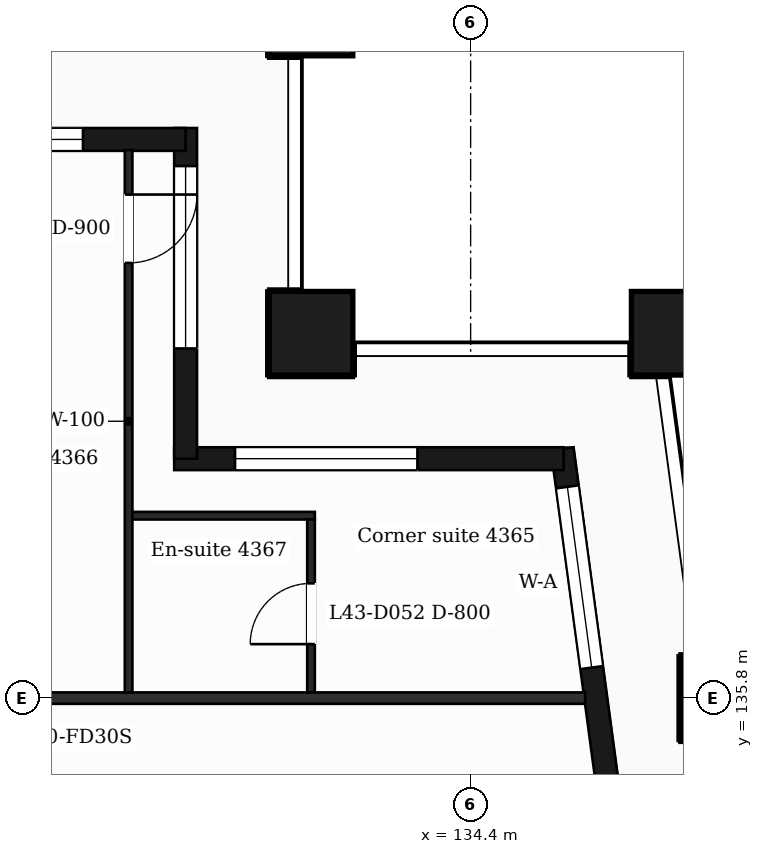
"""IFC4 building model, lengths in metres.
Left out: names, types, materials, properties, quantities, classifications, styles, units other than length and angle.
Written with IfcOpenShell. Run it as: python <this file> out.ifc"""

import sys

from ifc_helpers import new_model, si_unit, direction, frame, frame_2d, origin, origin_2d, place, context, subcontext, project, spatial, rectangle, extrude, element, fill, save


model = new_model("IFC4")
c1 = context("Model", 3, precision=1e-05, world=origin(), true_north=direction((0.0, 1.0)))
c2 = subcontext(c1, "Body", "Model", "MODEL_VIEW")
j1 = project(units=[si_unit("LENGTHUNIT", "METRE"), si_unit("PLANEANGLEUNIT", "RADIAN")], contexts=[c1])
p1 = place(None, origin())
s1 = spatial("IfcSite", under=j1, at=p1, CompositionType="ELEMENT")
p2 = place(p1, origin())
s2 = spatial("IfcBuilding", under=s1, at=p2, CompositionType="ELEMENT")
p3 = place(p2, frame((0.0, 0.0, 181.1)))
s3 = spatial("IfcBuildingStorey", under=s2, at=p3, CompositionType="ELEMENT", Elevation=181.1)
for number, where, z_axis, x_axis in (
    (1, (132.3, 140.6, 0.0), (0.0, 0.0, 1.0), (1.0, 0.0, 0.0)),
    (2, (137.065, 140.6, 0.0), (0.0, 0.0, 1.0), (1.0, 0.0, 0.0)),
    (3, (137.711, 135.8, 0.0), (0.0, 0.0, 1.0), (1.0, 0.0, 0.0)),
    (4, (132.3, 144.8, 0.0), (0.0, 0.0, 1.0), (1.0, 0.0, 0.0)),
):
    element("IfcColumn", number, at=place(p3, frame(where, z_axis=z_axis, x_axis=x_axis)), inside=s3, PredefinedType="COLUMN", context=c2, shape_type="SweptSolid", body=[
        extrude(rectangle(XDim=1.1, YDim=1.1, at=origin_2d()), origin(), (0.0, 0.0, 1.0), 3.7),
    ])
p4 = place(p3, frame((136.504, 132.4, 0.0), z_axis=(0.0, 0.0, 1.0), x_axis=(-0.133399697462, 0.99106231929, 0.0)))
e5 = element("IfcWall", 5, at=p4, inside=s3, PredefinedType="SOLIDWALL", context=c2, shape_type="SweptSolid", body=[
    extrude(rectangle(XDim=6.74, YDim=0.3, at=frame_2d((3.37, 0.0))), origin(), (0.0, 0.0, 1.0), 3.38),
])
p5 = place(p4, frame((1.115, 0.0, 0.0)))
e6 = element("IfcOpeningElement", 6, at=p5, cuts=e5, PredefinedType="OPENING", context=c2, shape_type="SweptSolid", body=[
    extrude(rectangle(XDim=1.2, YDim=2.4, at=frame_2d((0.6, 1.2))), frame((0.0, 0.16, 0.0), z_axis=(0.0, -1.0, 0.0), x_axis=(1.0, 0.0, 0.0)), (0.0, 0.0, 1.0), 0.32),
])
p6 = place(p4, frame((3.835, 0.0, 0.9)))
e7 = element("IfcOpeningElement", 7, at=p6, cuts=e5, PredefinedType="OPENING", context=c2, shape_type="SweptSolid", body=[
    extrude(rectangle(XDim=2.4, YDim=2.1, at=frame_2d((1.2, 1.05))), frame((0.0, 0.16, 0.0), z_axis=(0.0, -1.0, 0.0), x_axis=(1.0, 0.0, 0.0)), (0.0, 0.0, 1.0), 0.32),
])
p7 = place(p3, frame((135.623, 138.95, 0.0), z_axis=(0.0, 0.0, 1.0), x_axis=(-1.0, 0.0, 0.0)))
e8 = element("IfcWall", 8, at=p7, inside=s3, PredefinedType="SOLIDWALL", context=c2, shape_type="SweptSolid", body=[
    extrude(rectangle(XDim=5.123, YDim=0.3, at=frame_2d((2.561, 0.0))), origin(), (0.0, 0.0, 1.0), 3.38),
])
p8 = place(p7, frame((1.923, 0.0, 0.9)))
e9 = element("IfcOpeningElement", 9, at=p8, cuts=e8, PredefinedType="OPENING", context=c2, shape_type="SweptSolid", body=[
    extrude(rectangle(XDim=2.4, YDim=2.1, at=frame_2d((1.2, 1.05))), frame((0.0, 0.16, 0.0), z_axis=(0.0, -1.0, 0.0), x_axis=(1.0, 0.0, 0.0)), (0.0, 0.0, 1.0), 0.32),
])
p9 = place(p3, frame((130.65, 138.95, 0.0), z_axis=(0.0, 0.0, 1.0), x_axis=(0.0, 1.0, 0.0)))
e10 = element("IfcWall", 10, at=p9, inside=s3, PredefinedType="SOLIDWALL", context=c2, shape_type="SweptSolid", body=[
    extrude(rectangle(XDim=4.35, YDim=0.3, at=frame_2d((2.175, 0.0))), origin(), (0.0, 0.0, 1.0), 3.38),
])
p10 = place(p9, frame((1.45, 0.0, 0.9)))
e11 = element("IfcOpeningElement", 11, at=p10, cuts=e10, PredefinedType="OPENING", context=c2, shape_type="SweptSolid", body=[
    extrude(rectangle(XDim=2.4, YDim=2.1, at=frame_2d((1.2, 1.05))), frame((0.0, 0.16, 0.0), z_axis=(0.0, -1.0, 0.0), x_axis=(1.0, 0.0, 0.0)), (0.0, 0.0, 1.0), 0.32),
])
p11 = place(p3, frame((130.65, 143.15, 0.0), z_axis=(0.0, 0.0, 1.0), x_axis=(-1.0, 0.0, 0.0)))
e12 = element("IfcWall", 12, at=p11, inside=s3, PredefinedType="SOLIDWALL", context=c2, shape_type="SweptSolid", body=[
    extrude(rectangle(XDim=14.25, YDim=0.3, at=frame_2d((7.125, 0.0))), origin(), (0.0, 0.0, 1.0), 3.38),
])
p12 = place(p11, frame((1.35, 0.0, 0.9)))
e13 = element("IfcOpeningElement", 13, at=p12, cuts=e12, PredefinedType="OPENING", context=c2, shape_type="SweptSolid", body=[
    extrude(rectangle(XDim=2.4, YDim=2.1, at=frame_2d((1.2, 1.05))), frame((0.0, 0.16, 0.0), z_axis=(0.0, -1.0, 0.0), x_axis=(1.0, 0.0, 0.0)), (0.0, 0.0, 1.0), 0.32),
])
p13 = place(p11, frame((6.15, 0.0, 0.0)))
e14 = element("IfcOpeningElement", 14, at=p13, cuts=e12, PredefinedType="OPENING", context=c2, shape_type="SweptSolid", body=[
    extrude(rectangle(XDim=1.2, YDim=2.4, at=frame_2d((0.6, 1.2))), frame((0.0, 0.16, 0.0), z_axis=(0.0, -1.0, 0.0), x_axis=(1.0, 0.0, 0.0)), (0.0, 0.0, 1.0), 0.32),
])
p14 = place(p11, frame((9.75, 0.0, 0.9)))
e15 = element("IfcOpeningElement", 15, at=p14, cuts=e12, PredefinedType="OPENING", context=c2, shape_type="SweptSolid", body=[
    extrude(rectangle(XDim=2.4, YDim=2.1, at=frame_2d((1.2, 1.05))), frame((0.0, 0.16, 0.0), z_axis=(0.0, -1.0, 0.0), x_axis=(1.0, 0.0, 0.0)), (0.0, 0.0, 1.0), 0.32),
])
p15 = place(p3, frame((90.895, 135.8, 0.0), z_axis=(0.0, 0.0, 1.0), x_axis=(1.0, 0.0, 0.0)))
e16 = element("IfcWall", 16, at=p15, inside=s3, PredefinedType="PARTITIONING", context=c2, shape_type="SweptSolid", body=[
    extrude(rectangle(XDim=45.011, YDim=0.15, at=frame_2d((22.505, 0.0))), origin(), (0.0, 0.0, 1.0), 3.38),
])
p16 = place(p15, frame((6.906, 0.0, 0.0)))
e17 = element("IfcOpeningElement", 17, at=p16, cuts=e16, PredefinedType="OPENING", context=c2, shape_type="SweptSolid", body=[
    extrude(rectangle(XDim=1.0, YDim=2.1, at=frame_2d((0.5, 1.05))), frame((0.0, 0.085, 0.0), z_axis=(0.0, -1.0, 0.0), x_axis=(1.0, 0.0, 0.0)), (0.0, 0.0, 1.0), 0.17),
])
p17 = place(p15, frame((11.875, 0.0, 0.0)))
e18 = element("IfcOpeningElement", 18, at=p17, cuts=e16, PredefinedType="OPENING", context=c2, shape_type="SweptSolid", body=[
    extrude(rectangle(XDim=0.95, YDim=2.1, at=frame_2d((0.475, 1.05))), frame((0.0, 0.085, 0.0), z_axis=(0.0, -1.0, 0.0), x_axis=(1.0, 0.0, 0.0)), (0.0, 0.0, 1.0), 0.17),
])
p18 = place(p15, frame((19.292, 0.0, 0.0)))
e19 = element("IfcOpeningElement", 19, at=p18, cuts=e16, PredefinedType="OPENING", context=c2, shape_type="SweptSolid", body=[
    extrude(rectangle(XDim=0.95, YDim=2.1, at=frame_2d((0.475, 1.05))), frame((0.0, 0.085, 0.0), z_axis=(0.0, -1.0, 0.0), x_axis=(1.0, 0.0, 0.0)), (0.0, 0.0, 1.0), 0.17),
])
p19 = place(p15, frame((23.418, 0.0, 0.0)))
e20 = element("IfcOpeningElement", 20, at=p19, cuts=e16, PredefinedType="OPENING", context=c2, shape_type="SweptSolid", body=[
    extrude(rectangle(XDim=0.95, YDim=2.1, at=frame_2d((0.475, 1.05))), frame((0.0, 0.085, 0.0), z_axis=(0.0, -1.0, 0.0), x_axis=(1.0, 0.0, 0.0)), (0.0, 0.0, 1.0), 0.17),
])
p20 = place(p15, frame((29.425, 0.0, 0.0)))
e21 = element("IfcOpeningElement", 21, at=p20, cuts=e16, PredefinedType="OPENING", context=c2, shape_type="SweptSolid", body=[
    extrude(rectangle(XDim=0.95, YDim=2.1, at=frame_2d((0.475, 1.05))), frame((0.0, 0.085, 0.0), z_axis=(0.0, -1.0, 0.0), x_axis=(1.0, 0.0, 0.0)), (0.0, 0.0, 1.0), 0.17),
])
p21 = place(p15, frame((31.63, 0.0, 0.0)))
e22 = element("IfcOpeningElement", 22, at=p21, cuts=e16, PredefinedType="OPENING", context=c2, shape_type="SweptSolid", body=[
    extrude(rectangle(XDim=0.95, YDim=2.1, at=frame_2d((0.475, 1.05))), frame((0.0, 0.085, 0.0), z_axis=(0.0, -1.0, 0.0), x_axis=(1.0, 0.0, 0.0)), (0.0, 0.0, 1.0), 0.17),
])
p22 = place(p15, frame((36.775, 0.0, 0.0)))
e23 = element("IfcOpeningElement", 23, at=p22, cuts=e16, PredefinedType="OPENING", context=c2, shape_type="SweptSolid", body=[
    extrude(rectangle(XDim=1.0, YDim=2.1, at=frame_2d((0.5, 1.05))), frame((0.0, 0.085, 0.0), z_axis=(0.0, -1.0, 0.0), x_axis=(1.0, 0.0, 0.0)), (0.0, 0.0, 1.0), 0.17),
])
p23 = place(p3, frame((129.9, 138.2, 0.0), z_axis=(0.0, 0.0, 1.0), x_axis=(1.0, 0.0, 0.0)))
e24 = element("IfcWall", 24, at=p23, inside=s3, PredefinedType="PARTITIONING", context=c2, shape_type="SweptSolid", body=[
    extrude(rectangle(XDim=2.45, YDim=0.1, at=frame_2d((1.225, 0.0))), origin(), (0.0, 0.0, 1.0), 3.38),
])
p24 = place(p3, frame((129.9, 135.875, 0.0), z_axis=(0.0, 0.0, 1.0), x_axis=(0.0, 1.0, 0.0)))
e25 = element("IfcWall", 25, at=p24, inside=s3, PredefinedType="PARTITIONING", context=c2, shape_type="SweptSolid", body=[
    extrude(rectangle(XDim=7.135, YDim=0.1, at=frame_2d((3.567, 0.0))), origin(), (0.0, 0.0, 1.0), 3.38),
])
p25 = place(p24, frame((5.65, 0.0, 0.0)))
e26 = element("IfcOpeningElement", 26, at=p25, cuts=e25, PredefinedType="OPENING", context=c2, shape_type="SweptSolid", body=[
    extrude(rectangle(XDim=0.9, YDim=2.1, at=frame_2d((0.45, 1.05))), frame((0.0, 0.06, 0.0), z_axis=(0.0, -1.0, 0.0), x_axis=(1.0, 0.0, 0.0)), (0.0, 0.0, 1.0), 0.12),
])
p26 = place(p3, frame((132.3, 135.875, 0.0), z_axis=(0.0, 0.0, 1.0), x_axis=(0.0, 1.0, 0.0)))
e27 = element("IfcWall", 27, at=p26, inside=s3, PredefinedType="PARTITIONING", context=c2, shape_type="SweptSolid", body=[
    extrude(rectangle(XDim=2.275, YDim=0.1, at=frame_2d((1.137, 0.0))), origin(), (0.0, 0.0, 1.0), 3.38),
])
p27 = place(p26, frame((0.635, 0.0, 0.0)))
e28 = element("IfcOpeningElement", 28, at=p27, cuts=e27, PredefinedType="OPENING", context=c2, shape_type="SweptSolid", body=[
    extrude(rectangle(XDim=0.8, YDim=2.1, at=frame_2d((0.4, 1.05))), frame((0.0, 0.06, 0.0), z_axis=(0.0, -1.0, 0.0), x_axis=(1.0, 0.0, 0.0)), (0.0, 0.0, 1.0), 0.12),
])
p28 = place(p6, origin())
e29 = element("IfcWindow", 29, at=p28, inside=s3, PartitioningType="SINGLE_PANEL", PredefinedType="WINDOW", context=c2, shape_type="SweptSolid", body=[
    extrude(rectangle(XDim=2.4, YDim=2.1, at=frame_2d((1.2, 1.05))), frame((0.0, 0.03, 0.0), z_axis=(0.0, -1.0, 0.0), x_axis=(1.0, 0.0, 0.0)), (0.0, 0.0, 1.0), 0.06),
])
fill(e7, e29)
p29 = place(p8, origin())
e30 = element("IfcWindow", 30, at=p29, inside=s3, PartitioningType="SINGLE_PANEL", PredefinedType="WINDOW", context=c2, shape_type="SweptSolid", body=[
    extrude(rectangle(XDim=2.4, YDim=2.1, at=frame_2d((1.2, 1.05))), frame((0.0, 0.03, 0.0), z_axis=(0.0, -1.0, 0.0), x_axis=(1.0, 0.0, 0.0)), (0.0, 0.0, 1.0), 0.06),
])
fill(e9, e30)
p30 = place(p10, origin())
e31 = element("IfcWindow", 31, at=p30, inside=s3, PartitioningType="SINGLE_PANEL", PredefinedType="WINDOW", context=c2, shape_type="SweptSolid", body=[
    extrude(rectangle(XDim=2.4, YDim=2.1, at=frame_2d((1.2, 1.05))), frame((0.0, 0.03, 0.0), z_axis=(0.0, -1.0, 0.0), x_axis=(1.0, 0.0, 0.0)), (0.0, 0.0, 1.0), 0.06),
])
fill(e11, e31)
p31 = place(p12, origin())
e32 = element("IfcWindow", 32, at=p31, inside=s3, PartitioningType="SINGLE_PANEL", PredefinedType="WINDOW", context=c2, shape_type="SweptSolid", body=[
    extrude(rectangle(XDim=2.4, YDim=2.1, at=frame_2d((1.2, 1.05))), frame((0.0, 0.03, 0.0), z_axis=(0.0, -1.0, 0.0), x_axis=(1.0, 0.0, 0.0)), (0.0, 0.0, 1.0), 0.06),
])
fill(e13, e32)
p32 = place(p25, origin())
e33 = element("IfcDoor", 33, at=p32, inside=s3, OperationType="SINGLE_SWING_RIGHT", PredefinedType="DOOR", context=c2, shape_type="SweptSolid", body=[
    extrude(rectangle(XDim=0.9, YDim=2.1, at=frame_2d((0.45, 1.05))), frame((0.0, 0.025, 0.0), z_axis=(0.0, -1.0, 0.0), x_axis=(1.0, 0.0, 0.0)), (0.0, 0.0, 1.0), 0.05),
])
fill(e26, e33)
p33 = place(p27, origin())
e34 = element("IfcDoor", 34, at=p33, inside=s3, OperationType="SINGLE_SWING_LEFT", PredefinedType="DOOR", context=c2, shape_type="SweptSolid", body=[
    extrude(rectangle(XDim=0.8, YDim=2.1, at=frame_2d((0.4, 1.05))), frame((0.0, 0.025, 0.0), z_axis=(0.0, -1.0, 0.0), x_axis=(1.0, 0.0, 0.0)), (0.0, 0.0, 1.0), 0.05),
])
fill(e28, e34)
save(model, sys.argv[1])
